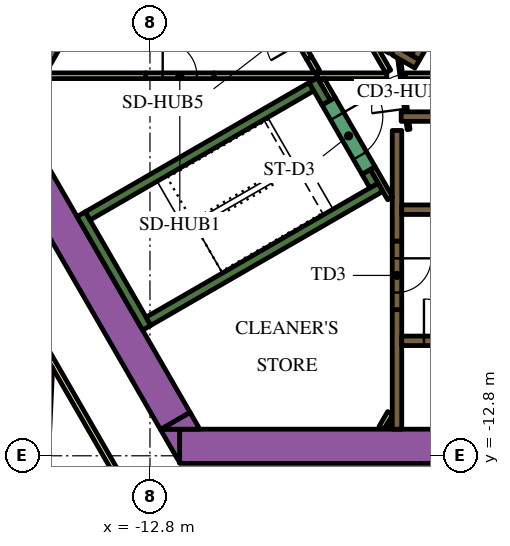
"""IFC4 building model, lengths in metres.
Left out: names, types, materials, properties, quantities, classifications, styles, units other than length and angle.
Written with IfcOpenShell. Run it as: python <this file> out.ifc"""

import sys

from ifc_helpers import new_model, si_unit, direction, frame, frame_2d, origin, place, context, subcontext, project, spatial, polyline, rectangle, outline, extrude, element, fill, save


model = new_model("IFC4")
c1 = context("Model", 3, precision=1e-05, world=origin(), true_north=direction((0.0, 1.0)))
c2 = subcontext(c1, "Body", "Model", "MODEL_VIEW")
j1 = project(units=[si_unit("LENGTHUNIT", "METRE"), si_unit("PLANEANGLEUNIT", "RADIAN")], contexts=[c1])
p1 = place(None, origin())
s1 = spatial("IfcSite", under=j1, at=p1, CompositionType="ELEMENT")
p2 = place(p1, origin())
s2 = spatial("IfcBuilding", under=s1, at=p2, CompositionType="ELEMENT")
p3 = place(p2, frame((0.0, 0.0, 58.8)))
s3 = spatial("IfcBuildingStorey", under=s2, at=p3, CompositionType="ELEMENT", Elevation=58.8)
p4 = place(p3, frame((-12.019, -12.55, 0.0), z_axis=(0.0, 0.0, 1.0), x_axis=(1.0, 0.0, 0.0)))
e1 = element("IfcWall", 1, at=p4, inside=s3, PredefinedType="SOLIDWALL", context=c2, shape_type="SweptSolid", body=[
    extrude(rectangle(XDim=21.63, YDim=0.9, at=frame_2d((10.815, 0.0))), origin(), (0.0, 0.0, 1.0), 3.9),
])
p5 = place(p3, origin())
e2 = element("IfcWall", 2, at=p5, inside=s3, PredefinedType="SOLIDWALL", context=c2, shape_type="SweptSolid", body=[
    extrude(outline(polyline([(-12.529, -12.1), (-12.021, -12.1), (-12.021, -12.98), (-12.529, -12.1)])), origin(), (0.0, 0.0, 1.0), 3.9),
])
p6 = place(p3, frame((-12.134, -11.883, 0.0), z_axis=(0.0, 0.0, 1.0), x_axis=(-0.500005339912, 0.866022320763, 0.0)))
e3 = element("IfcWall", 3, at=p6, inside=s3, PredefinedType="SOLIDWALL", context=c2, shape_type="SweptSolid", body=[
    extrude(rectangle(XDim=9.488, YDim=0.9, at=frame_2d((4.744, 0.0))), origin(), (0.0, 0.0, 1.0), 3.9),
])
e4 = element("IfcWall", 4, at=p5, inside=s3, PredefinedType="SOLIDWALL", context=c2, shape_type="SweptSolid", body=[
    extrude(outline(polyline([(-11.489, -12.1), (-12.505, -12.1), (-11.743, -11.66), (-11.489, -12.1)])), origin(), (0.0, 0.0, 1.0), 3.9),
])
p7 = place(p3, frame((-15.118, -1.085, 0.0), z_axis=(0.0, 0.0, 1.0), x_axis=(-0.50006606081, -0.865987260198, 0.0)))
e5 = element("IfcWall", 5, at=p7, inside=s3, PredefinedType="SOLIDWALL", context=c2, shape_type="SweptSolid", body=[
    extrude(rectangle(XDim=2.481, YDim=0.9, at=frame_2d((1.24, 0.0))), origin(), (0.0, 0.0, 1.0), 3.9),
])
p8 = place(p3, frame((-12.885, -9.431, 0.0), z_axis=(0.0, 0.0, 1.0), x_axis=(-0.500020560727, 0.866013532718, 0.0)))
e6 = element("IfcWall", 6, at=p8, inside=s3, PredefinedType="SOLIDWALL", context=c2, shape_type="SweptSolid", body=[
    extrude(rectangle(XDim=3.45, YDim=0.25, at=frame_2d((1.725, 0.0))), origin(), (0.0, 0.0, 1.0), 3.9),
])
p9 = place(p3, frame((-14.44, -6.49, 0.0), z_axis=(0.0, 0.0, 1.0), x_axis=(0.866022966069, 0.500004222222, 0.0)))
e7 = element("IfcWall", 7, at=p9, inside=s3, PredefinedType="SOLIDWALL", context=c2, shape_type="SweptSolid", body=[
    extrude(rectangle(XDim=6.8, YDim=0.25, at=frame_2d((3.4, 0.0))), origin(), (0.0, 0.0, 1.0), 3.9),
])
p10 = place(p3, frame((-8.163, -3.511, 0.0), z_axis=(0.0, 0.0, 1.0), x_axis=(-0.500206266495, 0.865906283012, 0.0)))
e8 = element("IfcWall", 8, at=p10, inside=s3, PredefinedType="SOLIDWALL", context=c2, shape_type="SweptSolid", body=[
    extrude(rectangle(XDim=0.684, YDim=0.25, at=frame_2d((0.342, 0.0))), origin(), (0.0, 0.0, 1.0), 3.9),
])
p11 = place(p3, frame((-12.84, -9.261, 0.0), z_axis=(0.0, 0.0, 1.0), x_axis=(0.866016039709, 0.500016218704, 0.0)))
e9 = element("IfcWall", 9, at=p11, inside=s3, PredefinedType="SOLIDWALL", context=c2, shape_type="SweptSolid", body=[
    extrude(rectangle(XDim=7.05, YDim=0.25, at=frame_2d((3.525, 0.0))), origin(), (0.0, 0.0, 1.0), 3.9),
])
p12 = place(p3, frame((-6.905, -5.69, 0.0), z_axis=(0.0, 0.0, 1.0), x_axis=(-0.499993700073, 0.866029041019, 0.0)))
e10 = element("IfcWall", 10, at=p12, inside=s3, PredefinedType="SOLIDWALL", context=c2, shape_type="SweptSolid", body=[
    extrude(rectangle(XDim=0.416, YDim=0.25, at=frame_2d((0.208, 0.0))), origin(), (0.0, 0.0, 1.0), 3.9),
])
p13 = place(p3, frame((-6.3, -12.1, 0.0), z_axis=(0.0, 0.0, 1.0), x_axis=(0.0, 1.0, 0.0)))
e11 = element("IfcWall", 11, at=p13, inside=s3, PredefinedType="SOLIDWALL", context=c2, shape_type="SweptSolid", body=[
    extrude(rectangle(XDim=3.146, YDim=0.25, at=frame_2d((1.573, 0.0))), origin(), (0.0, 0.0, 1.0), 3.9),
])
p14 = place(p3, frame((-6.3, -4.24, 0.0), z_axis=(0.0, 0.0, 1.0), x_axis=(0.0, -1.0, 0.0)))
e12 = element("IfcWall", 12, at=p14, inside=s3, PredefinedType="SOLIDWALL", context=c2, shape_type="SweptSolid", body=[
    extrude(rectangle(XDim=2.914, YDim=0.25, at=frame_2d((1.457, 0.0))), origin(), (0.0, 0.0, 1.0), 3.9),
])
p15 = place(p3, frame((-6.19, -3.875, 0.0), z_axis=(0.0, 0.0, 1.0), x_axis=(1.0, 0.0, 0.0)))
e13 = element("IfcWall", 13, at=p15, inside=s3, PredefinedType="SOLIDWALL", context=c2, shape_type="SweptSolid", body=[
    extrude(rectangle(XDim=12.615, YDim=0.25, at=frame_2d((6.307, 0.0))), origin(), (0.0, 0.0, 1.0), 3.9),
])
e14 = element("IfcWall", 14, at=p5, inside=s3, PredefinedType="SOLIDWALL", context=c2, shape_type="SweptSolid", body=[
    extrude(outline(polyline([(-5.922, -2.257), (-5.922, -2.257), (-5.705, -2.382), (-5.83, -2.598), (-6.418, -2.258), (-6.433, -2.153), (-6.433, -2.153), (-6.433, -2.153), (-6.508, -2.163), (-6.508, -2.163), (-6.508, -2.163), (-6.501, -2.21), (-7.952, -1.373), (-7.827, -1.156), (-5.922, -2.257)])), origin(), (0.0, 0.0, 1.0), 3.9),
])
p16 = place(p3, frame((-6.708, -12.068, 0.0), z_axis=(0.0, 0.0, 1.0), x_axis=(0.500000789788, 0.8660249478, 0.0)))
e15 = element("IfcWall", 15, at=p16, inside=s3, PredefinedType="PARTITIONING", context=c2, shape_type="SweptSolid", body=[
    extrude(rectangle(XDim=0.456, YDim=0.15, at=frame_2d((0.228, 0.0))), origin(), (0.0, 0.0, 1.0), 2.75),
])
p17 = place(p3, frame((-6.534, -12.068, 0.0), z_axis=(0.0, 0.0, 1.0), x_axis=(0.500240224089, 0.865886665912, 0.0)))
e16 = element("IfcWall", 16, at=p17, inside=s3, PredefinedType="PARTITIONING", context=c2, shape_type="SweptSolid", body=[
    extrude(rectangle(XDim=0.109, YDim=0.15, at=frame_2d((0.054, 0.0))), origin(), (0.0, 0.0, 1.0), 2.75),
])
p18 = place(p3, frame((-6.48, -6.027, 0.0), z_axis=(0.0, 0.0, 1.0), x_axis=(-0.499936960004, 0.866061796884, 0.0)))
e17 = element("IfcWall", 17, at=p18, inside=s3, PredefinedType="PARTITIONING", context=c2, shape_type="SweptSolid", body=[
    extrude(rectangle(XDim=0.919, YDim=0.15, at=frame_2d((0.46, 0.0))), origin(), (0.0, 0.0, 1.0), 3.9),
])
p19 = place(p3, frame((-12.915, -2.8, 0.0), z_axis=(0.0, 0.0, 1.0), x_axis=(-1.0, 0.0, 0.0)))
e18 = element("IfcWall", 18, at=p19, inside=s3, PredefinedType="PARTITIONING", context=c2, shape_type="SweptSolid", body=[
    extrude(rectangle(XDim=2.637, YDim=0.15, at=frame_2d((1.318, 0.0))), origin(), (0.0, 0.0, 1.0), 2.75),
])
p20 = place(p3, frame((-8.395, -2.8, 0.0), z_axis=(0.0, 0.0, 1.0), x_axis=(1.0, 0.0, 0.0)))
e19 = element("IfcWall", 19, at=p20, inside=s3, PredefinedType="PARTITIONING", context=c2, shape_type="SweptSolid", body=[
    extrude(rectangle(XDim=1.828, YDim=0.15, at=frame_2d((0.914, 0.0))), origin(), (0.0, 0.0, 1.0), 2.75),
])
p21 = place(p3, frame((-11.115, -2.8, 0.0), z_axis=(0.0, 0.0, 1.0), x_axis=(1.0, 0.0, 0.0)))
e20 = element("IfcWall", 20, at=p21, inside=s3, PredefinedType="PARTITIONING", context=c2, shape_type="SweptSolid", body=[
    extrude(rectangle(XDim=2.708, YDim=0.15, at=frame_2d((1.354, 0.0))), origin(), (0.0, 0.0, 1.0), 2.75),
])
p22 = place(p3, frame((-6.531, -2.689, 0.0), z_axis=(0.0, 0.0, 1.0), x_axis=(-0.499967446111, 0.866044197965, 0.0)))
e21 = element("IfcWall", 21, at=p22, inside=s3, PredefinedType="PARTITIONING", context=c2, shape_type="SweptSolid", body=[
    extrude(rectangle(XDim=0.748, YDim=0.15, at=frame_2d((0.374, 0.0))), origin(), (0.0, 0.0, 1.0), 2.75),
])
p23 = place(p3, frame((-7.99, -3.412, 0.0), z_axis=(0.0, 0.0, 1.0), x_axis=(-0.500193841991, 0.86591346013, 0.0)))
e22 = element("IfcWall", 22, at=p23, inside=s3, PredefinedType="PARTITIONING", context=c2, shape_type="SweptSolid", body=[
    extrude(rectangle(XDim=0.583, YDim=0.15, at=frame_2d((0.292, 0.0))), origin(), (0.0, 0.0, 1.0), 2.75),
])
p24 = place(p3, frame((-8.612, -2.333, 0.0), z_axis=(0.0, 0.0, 1.0), x_axis=(0.500248216681, -0.86588204838, 0.0)))
e23 = element("IfcWall", 23, at=p24, inside=s3, PredefinedType="PARTITIONING", context=c2, shape_type="SweptSolid", body=[
    extrude(rectangle(XDim=0.415, YDim=0.15, at=frame_2d((0.208, 0.0))), origin(), (0.0, 0.0, 1.0), 2.75),
])
p25 = place(p3, frame((-6.086, -2.801, 0.0), z_axis=(0.0, 0.0, 1.0), x_axis=(1.0, 0.0, 0.0)))
e24 = element("IfcWall", 24, at=p25, inside=s3, PredefinedType="PARTITIONING", context=c2, shape_type="SweptSolid", body=[
    extrude(rectangle(XDim=7.524, YDim=0.15, at=frame_2d((3.762, 0.0))), origin(), (0.0, 0.0, 1.0), 2.75),
])
p26 = place(p3, frame((-6.175, -9.775, 0.0), z_axis=(0.0, 0.0, 1.0), x_axis=(1.0, 0.0, 0.0)))
e25 = element("IfcWall", 25, at=p26, inside=s3, PredefinedType="SOLIDWALL", context=c2, shape_type="SweptSolid", body=[
    extrude(rectangle(XDim=12.35, YDim=0.25, at=frame_2d((6.175, 0.0))), origin(), (0.0, 0.0, 1.0), 3.9),
])
p27 = place(p26, frame((0.585, 0.0, 0.0)))
e26 = element("IfcOpeningElement", 26, at=p27, cuts=e25, PredefinedType="OPENING", context=c2, shape_type="SweptSolid", body=[
    extrude(rectangle(XDim=1.1, YDim=2.1, at=frame_2d((0.55, 1.05))), frame((0.0, 0.135, 0.0), z_axis=(0.0, -1.0, 0.0), x_axis=(1.0, 0.0, 0.0)), (0.0, 0.0, 1.0), 0.27),
])
p28 = place(p26, frame((3.105, 0.0, 0.0)))
e27 = element("IfcOpeningElement", 27, at=p28, cuts=e25, PredefinedType="OPENING", context=c2, shape_type="SweptSolid", body=[
    extrude(rectangle(XDim=1.1, YDim=2.1, at=frame_2d((0.55, 1.05))), frame((0.0, 0.135, 0.0), z_axis=(0.0, -1.0, 0.0), x_axis=(1.0, 0.0, 0.0)), (0.0, 0.0, 1.0), 0.27),
])
p29 = place(p26, frame((5.625, 0.0, 0.0)))
e28 = element("IfcOpeningElement", 28, at=p29, cuts=e25, PredefinedType="OPENING", context=c2, shape_type="SweptSolid", body=[
    extrude(rectangle(XDim=1.1, YDim=2.1, at=frame_2d((0.55, 1.05))), frame((0.0, 0.135, 0.0), z_axis=(0.0, -1.0, 0.0), x_axis=(1.0, 0.0, 0.0)), (0.0, 0.0, 1.0), 0.27),
])
p30 = place(p26, frame((8.145, 0.0, 0.0)))
e29 = element("IfcOpeningElement", 29, at=p30, cuts=e25, PredefinedType="OPENING", context=c2, shape_type="SweptSolid", body=[
    extrude(rectangle(XDim=1.1, YDim=2.1, at=frame_2d((0.55, 1.05))), frame((0.0, 0.135, 0.0), z_axis=(0.0, -1.0, 0.0), x_axis=(1.0, 0.0, 0.0)), (0.0, 0.0, 1.0), 0.27),
])
p31 = place(p26, frame((10.665, 0.0, 0.0)))
e30 = element("IfcOpeningElement", 30, at=p31, cuts=e25, PredefinedType="OPENING", context=c2, shape_type="SweptSolid", body=[
    extrude(rectangle(XDim=1.1, YDim=2.1, at=frame_2d((0.55, 1.05))), frame((0.0, 0.135, 0.0), z_axis=(0.0, -1.0, 0.0), x_axis=(1.0, 0.0, 0.0)), (0.0, 0.0, 1.0), 0.27),
])
p32 = place(p3, frame((-6.175, -6.325, 0.0), z_axis=(0.0, 0.0, 1.0), x_axis=(1.0, 0.0, 0.0)))
e31 = element("IfcWall", 31, at=p32, inside=s3, PredefinedType="SOLIDWALL", context=c2, shape_type="SweptSolid", body=[
    extrude(rectangle(XDim=12.35, YDim=0.25, at=frame_2d((6.175, 0.0))), origin(), (0.0, 0.0, 1.0), 3.9),
])
p33 = place(p32, frame((3.205, 0.0, 0.0)))
e32 = element("IfcOpeningElement", 32, at=p33, cuts=e31, PredefinedType="OPENING", context=c2, shape_type="SweptSolid", body=[
    extrude(rectangle(XDim=0.9, YDim=2.1, at=frame_2d((0.45, 1.05))), frame((0.0, 0.135, 0.0), z_axis=(0.0, -1.0, 0.0), x_axis=(1.0, 0.0, 0.0)), (0.0, 0.0, 1.0), 0.27),
])
p34 = place(p32, frame((8.145, 0.0, 0.0)))
e33 = element("IfcOpeningElement", 33, at=p34, cuts=e31, PredefinedType="OPENING", context=c2, shape_type="SweptSolid", body=[
    extrude(rectangle(XDim=1.1, YDim=2.1, at=frame_2d((0.55, 1.05))), frame((0.0, 0.135, 0.0), z_axis=(0.0, -1.0, 0.0), x_axis=(1.0, 0.0, 0.0)), (0.0, 0.0, 1.0), 0.27),
])
p35 = place(p32, frame((10.665, 0.0, 0.0)))
e34 = element("IfcOpeningElement", 34, at=p35, cuts=e31, PredefinedType="OPENING", context=c2, shape_type="SweptSolid", body=[
    extrude(rectangle(XDim=1.1, YDim=2.1, at=frame_2d((0.55, 1.05))), frame((0.0, 0.135, 0.0), z_axis=(0.0, -1.0, 0.0), x_axis=(1.0, 0.0, 0.0)), (0.0, 0.0, 1.0), 0.27),
])
p36 = place(p3, frame((-0.898, 6.194, 0.0), z_axis=(0.0, 0.0, 1.0), x_axis=(-0.499996202215, -0.866027596426, 0.0)))
e35 = element("IfcWall", 35, at=p36, inside=s3, PredefinedType="SOLIDWALL", context=c2, shape_type="SweptSolid", body=[
    extrude(rectangle(XDim=9.83, YDim=0.25, at=frame_2d((4.915, 0.0))), origin(), (0.0, 0.0, 1.0), 3.9),
])
p37 = place(p36, frame((0.585, 0.0, 0.0)))
e36 = element("IfcOpeningElement", 36, at=p37, cuts=e35, PredefinedType="OPENING", context=c2, shape_type="SweptSolid", body=[
    extrude(rectangle(XDim=1.1, YDim=2.1, at=frame_2d((0.55, 1.05))), frame((0.0, 0.135, 0.0), z_axis=(0.0, -1.0, 0.0), x_axis=(1.0, 0.0, 0.0)), (0.0, 0.0, 1.0), 0.27),
])
p38 = place(p36, frame((3.105, 0.0, 0.0)))
e37 = element("IfcOpeningElement", 37, at=p38, cuts=e35, PredefinedType="OPENING", context=c2, shape_type="SweptSolid", body=[
    extrude(rectangle(XDim=1.1, YDim=2.1, at=frame_2d((0.55, 1.05))), frame((0.0, 0.135, 0.0), z_axis=(0.0, -1.0, 0.0), x_axis=(1.0, 0.0, 0.0)), (0.0, 0.0, 1.0), 0.27),
])
p39 = place(p36, frame((5.625, 0.0, 0.0)))
e38 = element("IfcOpeningElement", 38, at=p39, cuts=e35, PredefinedType="OPENING", context=c2, shape_type="SweptSolid", body=[
    extrude(rectangle(XDim=1.1, YDim=2.1, at=frame_2d((0.55, 1.05))), frame((0.0, 0.135, 0.0), z_axis=(0.0, -1.0, 0.0), x_axis=(1.0, 0.0, 0.0)), (0.0, 0.0, 1.0), 0.27),
])
p40 = place(p36, frame((8.145, 0.0, 0.0)))
e39 = element("IfcOpeningElement", 39, at=p40, cuts=e35, PredefinedType="OPENING", context=c2, shape_type="SweptSolid", body=[
    extrude(rectangle(XDim=1.1, YDim=2.1, at=frame_2d((0.55, 1.05))), frame((0.0, 0.135, 0.0), z_axis=(0.0, -1.0, 0.0), x_axis=(1.0, 0.0, 0.0)), (0.0, 0.0, 1.0), 0.27),
])
p41 = place(p3, frame((-8.098, -3.474, 0.0), z_axis=(0.0, 0.0, 1.0), x_axis=(0.49994051562, -0.866059744384, 0.0)))
e40 = element("IfcWall", 40, at=p41, inside=s3, PredefinedType="SOLIDWALL", context=c2, shape_type="SweptSolid", body=[
    extrude(rectangle(XDim=2.1, YDim=0.4, at=frame_2d((1.05, 0.0))), origin(), (0.0, 0.0, 1.0), 3.9),
])
p42 = place(p41, frame((0.45, 0.0, 0.0)))
e41 = element("IfcOpeningElement", 41, at=p42, cuts=e40, PredefinedType="OPENING", context=c2, shape_type="SweptSolid", body=[
    extrude(rectangle(XDim=1.2, YDim=2.1, at=frame_2d((0.6, 1.05))), frame((0.0, 0.21, 0.0), z_axis=(0.0, -1.0, 0.0), x_axis=(1.0, 0.0, 0.0)), (0.0, 0.0, 1.0), 0.42),
])
p43 = place(p3, frame((-6.3, -7.154, 0.0), z_axis=(0.0, 0.0, 1.0), x_axis=(0.0, -1.0, 0.0)))
e42 = element("IfcWall", 42, at=p43, inside=s3, PredefinedType="SOLIDWALL", context=c2, shape_type="SweptSolid", body=[
    extrude(rectangle(XDim=1.8, YDim=0.25, at=frame_2d((0.9, 0.0))), origin(), (0.0, 0.0, 1.0), 3.9),
])
p44 = place(p43, frame((0.45, 0.0, 0.0)))
e43 = element("IfcOpeningElement", 43, at=p44, cuts=e42, PredefinedType="OPENING", context=c2, shape_type="SweptSolid", body=[
    extrude(rectangle(XDim=0.9, YDim=2.1, at=frame_2d((0.45, 1.05))), frame((0.0, 0.135, 0.0), z_axis=(0.0, -1.0, 0.0), x_axis=(1.0, 0.0, 0.0)), (0.0, 0.0, 1.0), 0.27),
])
p45 = place(p3, frame((-5.995, -4.213, 0.0), z_axis=(0.0, 0.0, 1.0), x_axis=(-0.132072335448, 0.991240081014, 0.0)))
e44 = element("IfcWall", 44, at=p45, inside=s3, PredefinedType="PARTITIONING", context=c2, shape_type="SweptSolid", body=[
    extrude(rectangle(XDim=2.1, YDim=0.076, at=frame_2d((1.05, 0.0))), origin(), (0.0, 0.0, 1.0), 2.75),
])
p46 = place(p45, frame((0.55, 0.0, 0.0)))
e45 = element("IfcOpeningElement", 45, at=p46, cuts=e44, PredefinedType="OPENING", context=c2, shape_type="SweptSolid", body=[
    extrude(rectangle(XDim=0.9, YDim=2.1, at=frame_2d((0.45, 1.05))), frame((0.0, 0.048, 0.0), z_axis=(0.0, -1.0, 0.0), x_axis=(1.0, 0.0, 0.0)), (0.0, 0.0, 1.0), 0.096),
])
p47 = place(p3, frame((-12.915, -2.8, 0.0), z_axis=(0.0, 0.0, 1.0), x_axis=(1.0, 0.0, 0.0)))
e46 = element("IfcWall", 46, at=p47, inside=s3, PredefinedType="PARTITIONING", context=c2, shape_type="SweptSolid", body=[
    extrude(rectangle(XDim=1.8, YDim=0.15, at=frame_2d((0.9, 0.0))), origin(), (0.0, 0.0, 1.0), 2.75),
])
p48 = place(p47, frame((0.45, 0.0, 0.0)))
e47 = element("IfcOpeningElement", 47, at=p48, cuts=e46, PredefinedType="OPENING", context=c2, shape_type="SweptSolid", body=[
    extrude(rectangle(XDim=0.9, YDim=2.1, at=frame_2d((0.45, 1.05))), frame((0.0, 0.085, 0.0), z_axis=(0.0, -1.0, 0.0), x_axis=(1.0, 0.0, 0.0)), (0.0, 0.0, 1.0), 0.17),
])
p49 = place(p3, frame((-8.612, -2.333, 0.0), z_axis=(0.0, 0.0, 1.0), x_axis=(-0.499961193289, 0.866047807691, 0.0)))
e48 = element("IfcWall", 48, at=p49, inside=s3, PredefinedType="PARTITIONING", context=c2, shape_type="SweptSolid", body=[
    extrude(rectangle(XDim=1.8, YDim=0.15, at=frame_2d((0.9, 0.0))), origin(), (0.0, 0.0, 1.0), 2.75),
])
p50 = place(p49, frame((0.45, 0.0, 0.0)))
e49 = element("IfcOpeningElement", 49, at=p50, cuts=e48, PredefinedType="OPENING", context=c2, shape_type="SweptSolid", body=[
    extrude(rectangle(XDim=0.9, YDim=2.1, at=frame_2d((0.45, 1.05))), frame((0.0, 0.085, 0.0), z_axis=(0.0, -1.0, 0.0), x_axis=(1.0, 0.0, 0.0)), (0.0, 0.0, 1.0), 0.17),
])
p51 = place(p3, frame((-19.081, -3.9, 0.0), z_axis=(0.0, 0.0, 1.0), x_axis=(0.499998313975, 0.866026377209, 0.0)))
e50 = element("IfcWall", 50, at=p51, inside=s3, PredefinedType="PARTITIONING", context=c2, shape_type="SweptSolid", body=[
    extrude(rectangle(XDim=25.766, YDim=0.15, at=frame_2d((12.883, 0.0))), origin(), (0.0, 0.0, 1.0), 2.75),
])
p52 = place(p51, frame((22.445, 0.0, 0.0)))
e51 = element("IfcOpeningElement", 51, at=p52, cuts=e50, PredefinedType="OPENING", context=c2, shape_type="SweptSolid", body=[
    extrude(rectangle(XDim=1.0, YDim=2.1, at=frame_2d((0.5, 1.05))), frame((0.0, 0.085, 0.0), z_axis=(0.0, -1.0, 0.0), x_axis=(1.0, 0.0, 0.0)), (0.0, 0.0, 1.0), 0.17),
])
p53 = place(p51, frame((21.138, 0.0, 0.0)))
e52 = element("IfcOpeningElement", 52, at=p53, cuts=e50, PredefinedType="OPENING", context=c2, shape_type="SweptSolid", body=[
    extrude(rectangle(XDim=1.0, YDim=2.1, at=frame_2d((0.5, 1.05))), frame((0.0, 0.085, 0.0), z_axis=(0.0, -1.0, 0.0), x_axis=(1.0, 0.0, 0.0)), (0.0, 0.0, 1.0), 0.17),
])
p54 = place(p51, frame((14.066, 0.0, 0.0)))
e53 = element("IfcOpeningElement", 53, at=p54, cuts=e50, PredefinedType="OPENING", context=c2, shape_type="SweptSolid", body=[
    extrude(rectangle(XDim=0.9, YDim=2.1, at=frame_2d((0.45, 1.05))), frame((0.0, 0.085, 0.0), z_axis=(0.0, -1.0, 0.0), x_axis=(1.0, 0.0, 0.0)), (0.0, 0.0, 1.0), 0.17),
])
p55 = place(p51, frame((11.693, 0.0, 0.0)))
e54 = element("IfcOpeningElement", 54, at=p55, cuts=e50, PredefinedType="OPENING", context=c2, shape_type="SweptSolid", body=[
    extrude(rectangle(XDim=1.0, YDim=2.1, at=frame_2d((0.5, 1.05))), frame((0.0, 0.085, 0.0), z_axis=(0.0, -1.0, 0.0), x_axis=(1.0, 0.0, 0.0)), (0.0, 0.0, 1.0), 0.17),
])
p56 = place(p3, frame((-12.918, -14.575, 0.0), z_axis=(0.0, 0.0, 1.0), x_axis=(-0.500009150678, 0.866020120573, 0.0)))
e55 = element("IfcWall", 55, at=p56, inside=s3, PredefinedType="PARTITIONING", context=c2, shape_type="SweptSolid", body=[
    extrude(rectangle(XDim=5.258, YDim=0.15, at=frame_2d((2.629, 0.0))), origin(), (0.0, 0.0, 1.0), 2.75),
])
p57 = place(p3, frame((-15.973, -22.109, 0.0), z_axis=(0.0, 0.0, 1.0), x_axis=(0.046191717129, 0.998932592955, 0.0)))
e56 = element("IfcWall", 56, at=p57, inside=s3, PredefinedType="PARTITIONING", context=c2, shape_type="SweptSolid", body=[
    extrude(rectangle(XDim=11.638, YDim=0.15, at=frame_2d((5.819, 0.0))), origin(), (0.0, 0.0, 1.0), 2.75),
])
p58 = place(p27, origin())
e57 = element("IfcDoor", 57, at=p58, inside=s3, OperationType="DOUBLE_DOOR_SLIDING", PredefinedType="DOOR", context=c2, shape_type="SweptSolid", body=[
    extrude(rectangle(XDim=1.1, YDim=2.1, at=frame_2d((0.55, 1.05))), frame((0.0, 0.025, 0.0), z_axis=(0.0, -1.0, 0.0), x_axis=(1.0, 0.0, 0.0)), (0.0, 0.0, 1.0), 0.05),
])
fill(e26, e57)
p59 = place(p42, origin())
e58 = element("IfcDoor", 58, at=p59, inside=s3, OperationType="SINGLE_SWING_LEFT", PredefinedType="DOOR", context=c2, shape_type="SweptSolid", body=[
    extrude(rectangle(XDim=1.2, YDim=2.1, at=frame_2d((0.6, 1.05))), frame((0.0, 0.025, 0.0), z_axis=(0.0, -1.0, 0.0), x_axis=(1.0, 0.0, 0.0)), (0.0, 0.0, 1.0), 0.05),
])
fill(e41, e58)
p60 = place(p44, origin())
e59 = element("IfcDoor", 59, at=p60, inside=s3, OperationType="SINGLE_SWING_LEFT", PredefinedType="DOOR", context=c2, shape_type="SweptSolid", body=[
    extrude(rectangle(XDim=0.9, YDim=2.1, at=frame_2d((0.45, 1.05))), frame((0.0, 0.025, 0.0), z_axis=(0.0, -1.0, 0.0), x_axis=(1.0, 0.0, 0.0)), (0.0, 0.0, 1.0), 0.05),
])
fill(e43, e59)
p61 = place(p46, origin())
e60 = element("IfcDoor", 60, at=p61, inside=s3, OperationType="SINGLE_SWING_LEFT", PredefinedType="DOOR", context=c2, shape_type="SweptSolid", body=[
    extrude(rectangle(XDim=0.9, YDim=2.1, at=frame_2d((0.45, 1.05))), frame((0.0, 0.025, 0.0), z_axis=(0.0, -1.0, 0.0), x_axis=(1.0, 0.0, 0.0)), (0.0, 0.0, 1.0), 0.05),
])
fill(e45, e60)
p62 = place(p48, origin())
e61 = element("IfcDoor", 61, at=p62, inside=s3, OperationType="SINGLE_SWING_LEFT", PredefinedType="DOOR", context=c2, shape_type="SweptSolid", body=[
    extrude(rectangle(XDim=0.9, YDim=2.1, at=frame_2d((0.45, 1.05))), frame((0.0, 0.025, 0.0), z_axis=(0.0, -1.0, 0.0), x_axis=(1.0, 0.0, 0.0)), (0.0, 0.0, 1.0), 0.05),
])
fill(e47, e61)
save(model, sys.argv[1])
